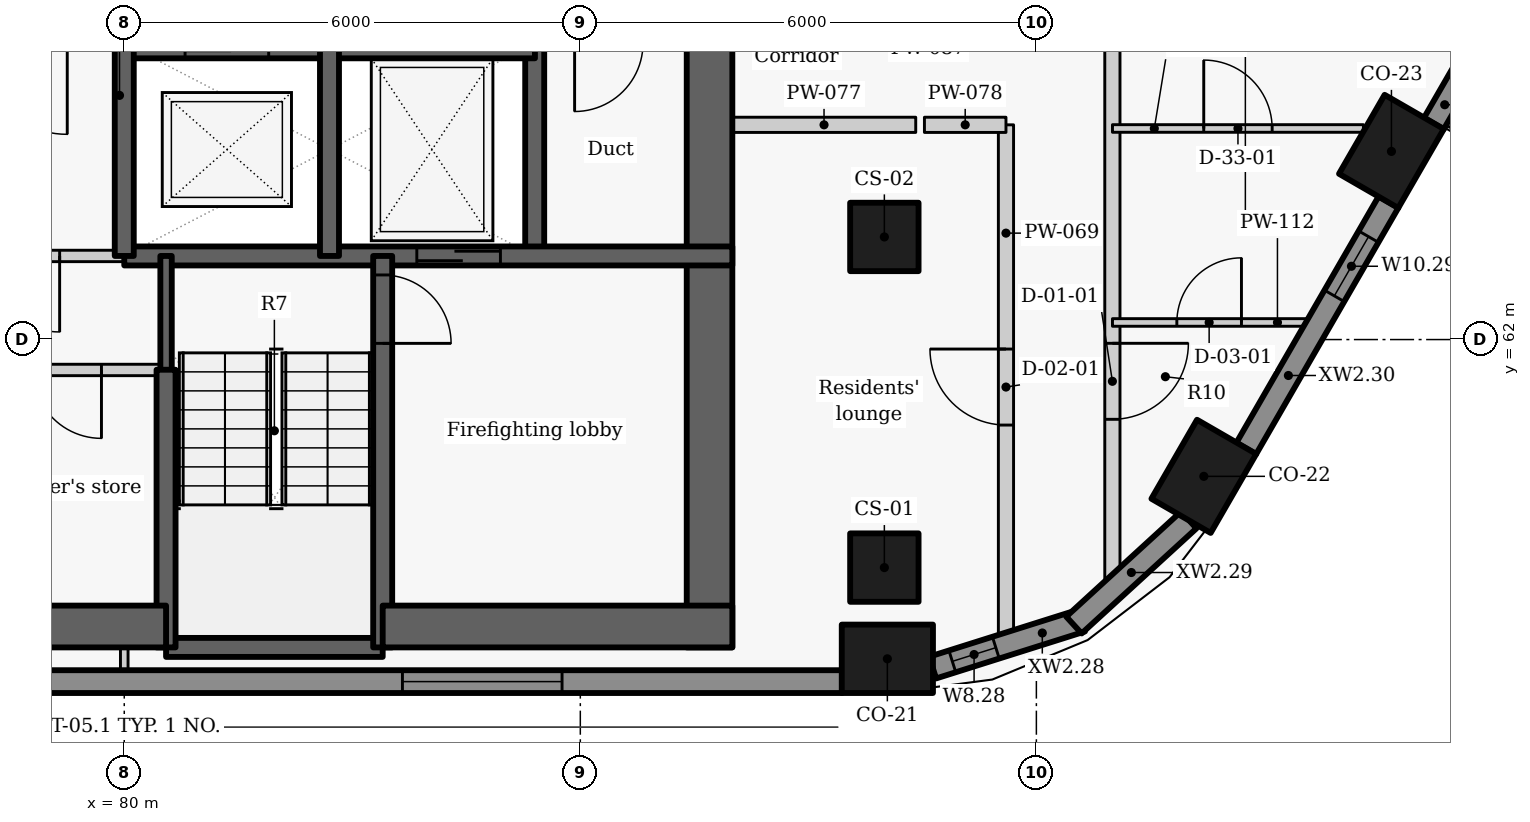
"""IFC4 building model, lengths in metres.
Left out: names, types, materials, properties, quantities, classifications, styles, units other than length and angle.
Written with IfcOpenShell. Run it as: python <this file> out.ifc"""

import sys

from ifc_helpers import new_model, si_unit, direction, frame, frame_2d, origin, origin_2d, place, context, subcontext, project, spatial, rectangle, extrude, element, fill, save


model = new_model("IFC4")
c1 = context("Model", 3, precision=1e-05, world=origin(), true_north=direction((0.0, 1.0)))
c2 = subcontext(c1, "Body", "Model", "MODEL_VIEW")
j1 = project(units=[si_unit("LENGTHUNIT", "METRE"), si_unit("PLANEANGLEUNIT", "RADIAN")], contexts=[c1])
p1 = place(None, origin())
s1 = spatial("IfcSite", under=j1, at=p1, CompositionType="ELEMENT")
p2 = place(p1, origin())
s2 = spatial("IfcBuilding", under=s1, at=p2, CompositionType="ELEMENT")
p3 = place(p2, frame((0.0, 0.0, 193.2)))
s3 = spatial("IfcBuildingStorey", under=s2, at=p3, CompositionType="ELEMENT", Elevation=193.2)
for number, where, z_axis, x_axis in (
    (1, (90.04, 57.8, 0.0), (0.0, 0.0, 1.0), (1.0, 0.0, 0.0)),
    (2, (94.203, 60.2, 0.0), (0.0, 0.0, 1.0), (0.5, 0.866, 0.0)),
    (3, (96.671, 64.475, 0.0), (0.0, 0.0, 1.0), (0.5, 0.866, 0.0)),
):
    element("IfcColumn", number, at=place(p3, frame(where, z_axis=z_axis, x_axis=x_axis)), inside=s3, PredefinedType="COLUMN", context=c2, shape_type="SweptSolid", body=[
        extrude(rectangle(XDim=1.2, YDim=0.9, at=origin_2d()), origin(), (0.0, 0.0, 1.0), 3.3),
    ])
for number, where, z_axis, x_axis in (
    (4, (90.0, 59.0, 0.0), (0.0, 0.0, 1.0), (0.0, 1.0, 0.0)),
    (5, (90.0, 63.35, 0.0), (0.0, 0.0, 1.0), (0.0, 1.0, 0.0)),
):
    element("IfcColumn", number, at=place(p3, frame(where, z_axis=z_axis, x_axis=x_axis)), inside=s3, PredefinedType="COLUMN", context=c2, shape_type="SweptSolid", body=[
        extrude(rectangle(XDim=0.9, YDim=0.9, at=origin_2d()), origin(), (0.0, 0.0, 1.0), 3.3),
    ])
p4 = place(p3, frame((70.551, 57.5, 0.0), z_axis=(0.0, 0.0, 1.0), x_axis=(1.0, 0.0, 0.0)))
e6 = element("IfcWall", 6, at=p4, inside=s3, PredefinedType="SOLIDWALL", context=c2, shape_type="SweptSolid", body=[
    extrude(rectangle(XDim=18.893, YDim=0.3, at=frame_2d((9.446, 0.0))), origin(), (0.0, 0.0, 1.0), 2.425),
])
p5 = place(p4, frame((3.687, 0.0, 0.9)))
e7 = element("IfcOpeningElement", 7, at=p5, cuts=e6, PredefinedType="OPENING", context=c2, shape_type="SweptSolid", body=[
    extrude(rectangle(XDim=2.1, YDim=1.1, at=frame_2d((1.05, 0.55))), frame((0.0, 0.16, 0.0), z_axis=(0.0, -1.0, 0.0), x_axis=(1.0, 0.0, 0.0)), (0.0, 0.0, 1.0), 0.32),
])
p6 = place(p4, frame((13.109, 0.0, 0.9)))
e8 = element("IfcOpeningElement", 8, at=p6, cuts=e6, PredefinedType="OPENING", context=c2, shape_type="SweptSolid", body=[
    extrude(rectangle(XDim=2.1, YDim=1.1, at=frame_2d((1.05, 0.55))), frame((0.0, 0.16, 0.0), z_axis=(0.0, -1.0, 0.0), x_axis=(1.0, 0.0, 0.0)), (0.0, 0.0, 1.0), 0.32),
])
p7 = place(p3, frame((90.636, 57.685, 0.0), z_axis=(0.0, 0.0, 1.0), x_axis=(0.95368324118, 0.300812691707, 0.0)))
e9 = element("IfcWall", 9, at=p7, inside=s3, PredefinedType="SOLIDWALL", context=c2, shape_type="SweptSolid", body=[
    extrude(rectangle(XDim=2.053, YDim=0.3, at=frame_2d((1.027, 0.0))), origin(), (0.0, 0.0, 1.0), 2.425),
])
p8 = place(p7, frame((0.271, 0.0, 0.9)))
e10 = element("IfcOpeningElement", 10, at=p8, cuts=e9, PredefinedType="OPENING", context=c2, shape_type="SweptSolid", body=[
    extrude(rectangle(XDim=0.6, YDim=1.1, at=frame_2d((0.3, 0.55))), frame((0.0, 0.16, 0.0), z_axis=(0.0, -1.0, 0.0), x_axis=(1.0, 0.0, 0.0)), (0.0, 0.0, 1.0), 0.32),
])
p9 = place(p3, frame((92.494, 58.244, 0.0), z_axis=(0.0, 0.0, 1.0), x_axis=(0.73764876128, 0.675184645102, 0.0)))
e11 = element("IfcWall", 11, at=p9, inside=s3, PredefinedType="SOLIDWALL", context=c2, shape_type="SweptSolid", body=[
    extrude(rectangle(XDim=2.048, YDim=0.3, at=frame_2d((1.024, 0.0))), origin(), (0.0, 0.0, 1.0), 2.425),
])
p10 = place(p3, frame((94.761, 60.567, 0.0), z_axis=(0.0, 0.0, 1.0), x_axis=(0.499982088007, 0.866035745032, 0.0)))
e12 = element("IfcWall", 12, at=p10, inside=s3, PredefinedType="SOLIDWALL", context=c2, shape_type="SweptSolid", body=[
    extrude(rectangle(XDim=3.744, YDim=0.3, at=frame_2d((1.872, 0.0))), origin(), (0.0, 0.0, 1.0), 2.425),
])
p11 = place(p10, frame((2.319, 0.0, 1.5)))
e13 = element("IfcOpeningElement", 13, at=p11, cuts=e12, PredefinedType="OPENING", context=c2, shape_type="SweptSolid", body=[
    extrude(rectangle(XDim=0.9, YDim=0.5, at=frame_2d((0.45, 0.25))), frame((0.0, 0.16, 0.0), z_axis=(0.0, -1.0, 0.0), x_axis=(1.0, 0.0, 0.0)), (0.0, 0.0, 1.0), 0.32),
])
p12 = place(p3, frame((97.229, 64.842, 0.0), z_axis=(0.0, 0.0, 1.0), x_axis=(0.500059225181, 0.86599120741, 0.0)))
e14 = element("IfcWall", 14, at=p12, inside=s3, PredefinedType="SOLIDWALL", context=c2, shape_type="SweptSolid", body=[
    extrude(rectangle(XDim=3.744, YDim=0.3, at=frame_2d((1.872, 0.0))), origin(), (0.0, 0.0, 1.0), 2.425),
])
p13 = place(p12, frame((0.672, 0.0, 0.0)))
e15 = element("IfcOpeningElement", 15, at=p13, cuts=e14, PredefinedType="OPENING", context=c2, shape_type="SweptSolid", body=[
    extrude(rectangle(XDim=2.4, YDim=2.0, at=frame_2d((1.2, 1.0))), frame((0.0, 0.16, 0.0), z_axis=(0.0, -1.0, 0.0), x_axis=(1.0, 0.0, 0.0)), (0.0, 0.0, 1.0), 0.32),
])
p14 = place(p3, frame((85.4, 63.1, -0.275), z_axis=(0.0, 0.0, 1.0), x_axis=(0.0, 1.0, 0.0)))
e16 = element("IfcWall", 16, at=p14, inside=s3, PredefinedType="SHEAR", context=c2, shape_type="SweptSolid", body=[
    extrude(rectangle(XDim=2.8, YDim=0.25, at=frame_2d((1.4, 0.0))), origin(), (0.0, 0.0, 1.0), 3.3),
])
p15 = place(p3, frame((87.7, 72.2, -0.275), z_axis=(0.0, 0.0, 1.0), x_axis=(0.0, -1.0, 0.0)))
e17 = element("IfcWall", 17, at=p15, inside=s3, PredefinedType="SHEAR", context=c2, shape_type="SweptSolid", body=[
    extrude(rectangle(XDim=14.25, YDim=0.6, at=frame_2d((7.125, 0.0))), origin(), (0.0, 0.0, 1.0), 3.3),
])
p16 = place(p15, frame((3.852, 0.0, 0.275)))
e18 = element("IfcOpeningElement", 18, at=p16, cuts=e17, PredefinedType="OPENING", context=c2, shape_type="SweptSolid", body=[
    extrude(rectangle(XDim=1.5, YDim=2.1, at=frame_2d((0.75, 1.05))), frame((0.0, 0.31, 0.0), z_axis=(0.0, -1.0, 0.0), x_axis=(1.0, 0.0, 0.0)), (0.0, 0.0, 1.0), 0.62),
])
p17 = place(p3, frame((79.997, 65.9, -0.275), z_axis=(0.0, 0.0, 1.0), x_axis=(1.0, 0.0, 0.0)))
e19 = element("IfcWall", 19, at=p17, inside=s3, PredefinedType="SHEAR", context=c2, shape_type="SweptSolid", body=[
    extrude(rectangle(XDim=5.406, YDim=0.4, at=frame_2d((2.703, 0.0))), origin(), (0.0, 0.0, 1.0), 3.3),
])
p18 = place(p17, frame((0.803, 0.0, 0.275)))
e20 = element("IfcOpeningElement", 20, at=p18, cuts=e19, PredefinedType="OPENING", context=c2, shape_type="SweptSolid", body=[
    extrude(rectangle(XDim=1.1, YDim=2.1, at=frame_2d((0.55, 1.05))), frame((0.0, 0.21, 0.0), z_axis=(0.0, -1.0, 0.0), x_axis=(1.0, 0.0, 0.0)), (0.0, 0.0, 1.0), 0.42),
])
p19 = place(p3, frame((80.0, 63.1, -0.275), z_axis=(0.0, 0.0, 1.0), x_axis=(1.0, 0.0, 0.0)))
e21 = element("IfcWall", 21, at=p19, inside=s3, PredefinedType="SHEAR", context=c2, shape_type="SweptSolid", body=[
    extrude(rectangle(XDim=8.0, YDim=0.25, at=frame_2d((4.0, 0.0))), origin(), (0.0, 0.0, 1.0), 3.3),
])
p20 = place(p19, frame((3.849, 0.0, 0.275)))
e22 = element("IfcOpeningElement", 22, at=p20, cuts=e21, PredefinedType="OPENING", context=c2, shape_type="SweptSolid", body=[
    extrude(rectangle(XDim=1.1, YDim=2.1, at=frame_2d((0.55, 1.05))), frame((0.0, 0.135, 0.0), z_axis=(0.0, -1.0, 0.0), x_axis=(1.0, 0.0, 0.0)), (0.0, 0.0, 1.0), 0.27),
])
p21 = place(p3, frame((80.0, 63.1, -0.275), z_axis=(0.0, 0.0, 1.0), x_axis=(0.0, 1.0, 0.0)))
e23 = element("IfcWall", 23, at=p21, inside=s3, PredefinedType="SHEAR", context=c2, shape_type="SweptSolid", body=[
    extrude(rectangle(XDim=2.8, YDim=0.25, at=frame_2d((1.4, 0.0))), origin(), (0.0, 0.0, 1.0), 3.3),
])
p22 = place(p3, frame((80.0, 63.1, 0.0), z_axis=(0.0, 0.0, 1.0), x_axis=(-1.0, 0.0, 0.0)))
e24 = element("IfcWall", 24, at=p22, inside=s3, PredefinedType="PARTITIONING", context=c2, shape_type="SweptSolid", body=[
    extrude(rectangle(XDim=2.7, YDim=0.15, at=frame_2d((1.35, 0.0))), origin(), (0.0, 0.0, 1.0), 3.025),
])
p23 = place(p22, frame((0.85, 0.0, 0.0)))
e25 = element("IfcOpeningElement", 25, at=p23, cuts=e24, PredefinedType="OPENING", context=c2, shape_type="SweptSolid", body=[
    extrude(rectangle(XDim=1.0, YDim=2.1, at=frame_2d((0.5, 1.05))), frame((0.0, 0.085, 0.0), z_axis=(0.0, -1.0, 0.0), x_axis=(1.0, 0.0, 0.0)), (0.0, 0.0, 1.0), 0.17),
])
p24 = place(p3, frame((82.7, 63.1, -0.275), z_axis=(0.0, 0.0, 1.0), x_axis=(0.0, 1.0, 0.0)))
e26 = element("IfcWall", 26, at=p24, inside=s3, PredefinedType="SHEAR", context=c2, shape_type="SweptSolid", body=[
    extrude(rectangle(XDim=2.8, YDim=0.25, at=frame_2d((1.4, 0.0))), origin(), (0.0, 0.0, 1.0), 3.3),
])
p25 = place(p3, frame((80.55, 57.95, -0.275), z_axis=(0.0, 0.0, 1.0), x_axis=(1.0, 0.0, 0.0)))
e27 = element("IfcWall", 27, at=p25, inside=s3, PredefinedType="SHEAR", context=c2, shape_type="SweptSolid", body=[
    extrude(rectangle(XDim=2.85, YDim=0.25, at=frame_2d((1.425, 0.0))), origin(), (0.0, 0.0, 1.0), 3.3),
])
p26 = place(p3, frame((83.4, 63.1, -0.275), z_axis=(0.0, 0.0, 1.0), x_axis=(0.0, -1.0, 0.0)))
e28 = element("IfcWall", 28, at=p26, inside=s3, PredefinedType="SHEAR", context=c2, shape_type="SweptSolid", body=[
    extrude(rectangle(XDim=5.15, YDim=0.25, at=frame_2d((2.575, 0.0))), origin(), (0.0, 0.0, 1.0), 3.3),
])
p27 = place(p26, frame((0.25, 0.0, 0.275)))
e29 = element("IfcOpeningElement", 29, at=p27, cuts=e28, PredefinedType="OPENING", context=c2, shape_type="SweptSolid", body=[
    extrude(rectangle(XDim=0.9, YDim=2.1, at=frame_2d((0.45, 1.05))), frame((0.0, 0.135, 0.0), z_axis=(0.0, -1.0, 0.0), x_axis=(1.0, 0.0, 0.0)), (0.0, 0.0, 1.0), 0.27),
])
p28 = place(p3, frame((80.55, 61.597, -0.275), z_axis=(0.0, 0.0, 1.0), x_axis=(0.0, 1.0, 0.0)))
e30 = element("IfcWall", 30, at=p28, inside=s3, PredefinedType="SHEAR", context=c2, shape_type="SweptSolid", body=[
    extrude(rectangle(XDim=1.503, YDim=0.15, at=frame_2d((0.751, 0.0))), origin(), (0.0, 0.0, 1.0), 3.3),
])
p29 = place(p3, frame((80.55, 57.95, -0.275), z_axis=(0.0, 0.0, 1.0), x_axis=(0.0, 1.0, 0.0)))
e31 = element("IfcWall", 31, at=p29, inside=s3, PredefinedType="SHEAR", context=c2, shape_type="SweptSolid", body=[
    extrude(rectangle(XDim=3.653, YDim=0.25, at=frame_2d((1.827, 0.0))), origin(), (0.0, 0.0, 1.0), 3.3),
])
p30 = place(p3, frame((75.35, 58.225, -0.275), z_axis=(0.0, 0.0, 1.0), x_axis=(1.0, 0.0, 0.0)))
e32 = element("IfcWall", 32, at=p30, inside=s3, PredefinedType="SHEAR", context=c2, shape_type="SweptSolid", body=[
    extrude(rectangle(XDim=5.2, YDim=0.55, at=frame_2d((2.6, 0.0))), origin(), (0.0, 0.0, 1.0), 3.3),
])
p31 = place(p3, frame((83.4, 58.225, -0.275), z_axis=(0.0, 0.0, 1.0), x_axis=(1.0, 0.0, 0.0)))
e33 = element("IfcWall", 33, at=p31, inside=s3, PredefinedType="SHEAR", context=c2, shape_type="SweptSolid", body=[
    extrude(rectangle(XDim=4.6, YDim=0.55, at=frame_2d((2.3, 0.0))), origin(), (0.0, 0.0, 1.0), 3.3),
])
p32 = place(p3, frame((80.55, 61.6, 0.0), z_axis=(0.0, 0.0, 1.0), x_axis=(-1.0, 0.0, 0.0)))
e34 = element("IfcWall", 34, at=p32, inside=s3, PredefinedType="PARTITIONING", context=c2, shape_type="SweptSolid", body=[
    extrude(rectangle(XDim=5.2, YDim=0.15, at=frame_2d((2.6, 0.0))), origin(), (0.0, 0.0, 1.0), 3.025),
])
p33 = place(p32, frame((3.45, 0.0, 0.0)))
e35 = element("IfcOpeningElement", 35, at=p33, cuts=e34, PredefinedType="OPENING", context=c2, shape_type="SweptSolid", body=[
    extrude(rectangle(XDim=0.9, YDim=2.1, at=frame_2d((0.45, 1.05))), frame((0.0, 0.085, 0.0), z_axis=(0.0, -1.0, 0.0), x_axis=(1.0, 0.0, 0.0)), (0.0, 0.0, 1.0), 0.17),
])
p34 = place(p32, frame((0.85, 0.0, 0.0)))
e36 = element("IfcOpeningElement", 36, at=p34, cuts=e34, PredefinedType="OPENING", context=c2, shape_type="SweptSolid", body=[
    extrude(rectangle(XDim=0.9, YDim=2.1, at=frame_2d((0.45, 1.05))), frame((0.0, 0.085, 0.0), z_axis=(0.0, -1.0, 0.0), x_axis=(1.0, 0.0, 0.0)), (0.0, 0.0, 1.0), 0.17),
])
p35 = place(p3, frame((91.6, 57.926, 0.0), z_axis=(0.0, 0.0, 1.0), x_axis=(0.0, 1.0, 0.0)))
e37 = element("IfcWall", 37, at=p35, inside=s3, PredefinedType="PARTITIONING", context=c2, shape_type="SweptSolid", body=[
    extrude(rectangle(XDim=6.899, YDim=0.2, at=frame_2d((3.449, 0.0))), origin(), (0.0, 0.0, 1.0), 2.405),
])
p36 = place(p35, frame((2.949, 0.0, 0.0)))
e38 = element("IfcOpeningElement", 38, at=p36, cuts=e37, PredefinedType="OPENING", context=c2, shape_type="SweptSolid", body=[
    extrude(rectangle(XDim=1.0, YDim=2.1, at=frame_2d((0.5, 1.05))), frame((0.0, 0.11, 0.0), z_axis=(0.0, -1.0, 0.0), x_axis=(1.0, 0.0, 0.0)), (0.0, 0.0, 1.0), 0.22),
])
p37 = place(p3, frame((88.0, 64.825, 0.0), z_axis=(0.0, 0.0, 1.0), x_axis=(1.0, 0.0, 0.0)))
e39 = element("IfcWall", 39, at=p37, inside=s3, PredefinedType="PARTITIONING", context=c2, shape_type="SweptSolid", body=[
    extrude(rectangle(XDim=2.413, YDim=0.2, at=frame_2d((1.207, 0.0))), origin(), (0.0, 0.0, 1.0), 2.505),
])
p38 = place(p3, frame((90.527, 64.825, 0.0), z_axis=(0.0, 0.0, 1.0), x_axis=(1.0, 0.0, 0.0)))
e40 = element("IfcWall", 40, at=p38, inside=s3, PredefinedType="PARTITIONING", context=c2, shape_type="SweptSolid", body=[
    extrude(rectangle(XDim=1.073, YDim=0.2, at=frame_2d((0.537, 0.0))), origin(), (0.0, 0.0, 1.0), 3.025),
])
p39 = place(p3, frame((93.0, 101.281, 0.0), z_axis=(0.0, 0.0, 1.0), x_axis=(0.0, -1.0, 0.0)))
e41 = element("IfcWall", 41, at=p39, inside=s3, PredefinedType="PARTITIONING", context=c2, shape_type="SweptSolid", body=[
    extrude(rectangle(XDim=42.606, YDim=0.2, at=frame_2d((21.303, 0.0))), origin(), (0.0, 0.0, 1.0), 2.405),
])
p40 = place(p39, frame((39.33, 0.0, 0.0)))
e42 = element("IfcOpeningElement", 42, at=p40, cuts=e41, PredefinedType="OPENING", context=c2, shape_type="SweptSolid", body=[
    extrude(rectangle(XDim=1.0, YDim=2.1, at=frame_2d((0.5, 1.05))), frame((0.0, 0.11, 0.0), z_axis=(0.0, -1.0, 0.0), x_axis=(1.0, 0.0, 0.0)), (0.0, 0.0, 1.0), 0.22),
])
p41 = place(p39, frame((27.005, 0.0, 0.0)))
e43 = element("IfcOpeningElement", 43, at=p41, cuts=e41, PredefinedType="OPENING", context=c2, shape_type="SweptSolid", body=[
    extrude(rectangle(XDim=1.0, YDim=2.1, at=frame_2d((0.5, 1.05))), frame((0.0, 0.11, 0.0), z_axis=(0.0, -1.0, 0.0), x_axis=(1.0, 0.0, 0.0)), (0.0, 0.0, 1.0), 0.22),
])
p42 = place(p39, frame((9.168, 0.0, 0.0)))
e44 = element("IfcOpeningElement", 44, at=p42, cuts=e41, PredefinedType="OPENING", context=c2, shape_type="SweptSolid", body=[
    extrude(rectangle(XDim=1.0, YDim=2.1, at=frame_2d((0.5, 1.05))), frame((0.0, 0.11, 0.0), z_axis=(0.0, -1.0, 0.0), x_axis=(1.0, 0.0, 0.0)), (0.0, 0.0, 1.0), 0.22),
])
p43 = place(p39, frame((3.937, 0.0, 0.0)))
e45 = element("IfcOpeningElement", 45, at=p43, cuts=e41, PredefinedType="OPENING", context=c2, shape_type="SweptSolid", body=[
    extrude(rectangle(XDim=1.0, YDim=2.1, at=frame_2d((0.5, 1.05))), frame((0.0, 0.11, 0.0), z_axis=(0.0, -1.0, 0.0), x_axis=(1.0, 0.0, 0.0)), (0.0, 0.0, 1.0), 0.22),
])
p44 = place(p3, frame((80.0, 57.65, 0.0), z_axis=(0.0, 0.0, 1.0), x_axis=(0.0, 1.0, 0.0)))
e46 = element("IfcWall", 46, at=p44, inside=s3, PredefinedType="PARTITIONING", context=c2, shape_type="SweptSolid", body=[
    extrude(rectangle(XDim=0.3, YDim=0.1, at=frame_2d((0.15, 0.0))), origin(), (0.0, 0.0, 1.0), 3.025),
])
p45 = place(p3, frame((93.001, 62.225, 0.0), z_axis=(0.0, 0.0, 1.0), x_axis=(1.0, 0.0, 0.0)))
e47 = element("IfcWall", 47, at=p45, inside=s3, PredefinedType="PARTITIONING", context=c2, shape_type="SweptSolid", body=[
    extrude(rectangle(XDim=2.544, YDim=0.1, at=frame_2d((1.272, 0.0))), origin(), (0.0, 0.0, 1.0), 2.405),
])
p46 = place(p45, frame((0.847, 0.0, 0.0)))
e48 = element("IfcOpeningElement", 48, at=p46, cuts=e47, PredefinedType="OPENING", context=c2, shape_type="SweptSolid", body=[
    extrude(rectangle(XDim=0.85, YDim=2.1, at=frame_2d((0.425, 1.05))), frame((0.0, 0.06, 0.0), z_axis=(0.0, -1.0, 0.0), x_axis=(1.0, 0.0, 0.0)), (0.0, 0.0, 1.0), 0.12),
])
p47 = place(p3, frame((93.001, 64.777, 0.0), z_axis=(0.0, 0.0, 1.0), x_axis=(1.0, 0.0, 0.0)))
e49 = element("IfcWall", 49, at=p47, inside=s3, PredefinedType="PARTITIONING", context=c2, shape_type="SweptSolid", body=[
    extrude(rectangle(XDim=3.302, YDim=0.1, at=frame_2d((1.651, 0.0))), origin(), (0.0, 0.0, 1.0), 3.025),
])
p48 = place(p47, frame((1.201, 0.0, 0.0)))
e50 = element("IfcOpeningElement", 50, at=p48, cuts=e49, PredefinedType="OPENING", context=c2, shape_type="SweptSolid", body=[
    extrude(rectangle(XDim=0.9, YDim=2.1, at=frame_2d((0.45, 1.05))), frame((0.0, 0.06, 0.0), z_axis=(0.0, -1.0, 0.0), x_axis=(1.0, 0.0, 0.0)), (0.0, 0.0, 1.0), 0.12),
])
p49 = place(p6, origin())
e51 = element("IfcWindow", 51, at=p49, inside=s3, PartitioningType="SINGLE_PANEL", PredefinedType="WINDOW", context=c2, shape_type="SweptSolid", body=[
    extrude(rectangle(XDim=2.1, YDim=1.1, at=frame_2d((1.05, 0.55))), frame((0.0, 0.03, 0.0), z_axis=(0.0, -1.0, 0.0), x_axis=(1.0, 0.0, 0.0)), (0.0, 0.0, 1.0), 0.06),
])
fill(e8, e51)
p50 = place(p8, origin())
e52 = element("IfcWindow", 52, at=p50, inside=s3, PartitioningType="SINGLE_PANEL", PredefinedType="WINDOW", context=c2, shape_type="SweptSolid", body=[
    extrude(rectangle(XDim=0.6, YDim=1.1, at=frame_2d((0.3, 0.55))), frame((0.0, 0.03, 0.0), z_axis=(0.0, -1.0, 0.0), x_axis=(1.0, 0.0, 0.0)), (0.0, 0.0, 1.0), 0.06),
])
fill(e10, e52)
p51 = place(p11, origin())
e53 = element("IfcWindow", 53, at=p51, inside=s3, PartitioningType="SINGLE_PANEL", PredefinedType="WINDOW", context=c2, shape_type="SweptSolid", body=[
    extrude(rectangle(XDim=0.9, YDim=0.5, at=frame_2d((0.45, 0.25))), frame((0.0, 0.03, 0.0), z_axis=(0.0, -1.0, 0.0), x_axis=(1.0, 0.0, 0.0)), (0.0, 0.0, 1.0), 0.06),
])
fill(e13, e53)
p52 = place(p20, origin())
e54 = element("IfcDoor", 54, at=p52, inside=s3, OperationType="SLIDING_TO_LEFT", PredefinedType="DOOR", context=c2, shape_type="SweptSolid", body=[
    extrude(rectangle(XDim=1.1, YDim=2.1, at=frame_2d((0.55, 1.05))), frame((0.0, 0.025, 0.0), z_axis=(0.0, -1.0, 0.0), x_axis=(1.0, 0.0, 0.0)), (0.0, 0.0, 1.0), 0.05),
])
fill(e22, e54)
p53 = place(p23, origin())
e55 = element("IfcDoor", 55, at=p53, inside=s3, OperationType="SINGLE_SWING_LEFT", PredefinedType="DOOR", context=c2, shape_type="SweptSolid", body=[
    extrude(rectangle(XDim=1.0, YDim=2.1, at=frame_2d((0.5, 1.05))), frame((0.0, 0.025, 0.0), z_axis=(0.0, -1.0, 0.0), x_axis=(1.0, 0.0, 0.0)), (0.0, 0.0, 1.0), 0.05),
])
fill(e25, e55)
p54 = place(p34, origin())
e56 = element("IfcDoor", 56, at=p54, inside=s3, OperationType="SINGLE_SWING_LEFT", PredefinedType="DOOR", context=c2, shape_type="SweptSolid", body=[
    extrude(rectangle(XDim=0.9, YDim=2.1, at=frame_2d((0.45, 1.05))), frame((0.0, 0.025, 0.0), z_axis=(0.0, -1.0, 0.0), x_axis=(1.0, 0.0, 0.0)), (0.0, 0.0, 1.0), 0.05),
])
fill(e36, e56)
p55 = place(p27, origin())
e57 = element("IfcDoor", 57, at=p55, inside=s3, OperationType="SINGLE_SWING_RIGHT", PredefinedType="DOOR", context=c2, shape_type="SweptSolid", body=[
    extrude(rectangle(XDim=0.9, YDim=2.1, at=frame_2d((0.45, 1.05))), frame((0.0, 0.025, 0.0), z_axis=(0.0, -1.0, 0.0), x_axis=(1.0, 0.0, 0.0)), (0.0, 0.0, 1.0), 0.05),
])
fill(e29, e57)
p56 = place(p36, origin())
e58 = element("IfcDoor", 58, at=p56, inside=s3, OperationType="SINGLE_SWING_RIGHT", PredefinedType="DOOR", context=c2, shape_type="SweptSolid", body=[
    extrude(rectangle(XDim=1.0, YDim=2.1, at=frame_2d((0.5, 1.05))), frame((0.0, 0.025, 0.0), z_axis=(0.0, -1.0, 0.0), x_axis=(1.0, 0.0, 0.0)), (0.0, 0.0, 1.0), 0.05),
])
fill(e38, e58)
p57 = place(p40, origin())
e59 = element("IfcDoor", 59, at=p57, inside=s3, OperationType="SINGLE_SWING_LEFT", PredefinedType="DOOR", context=c2, shape_type="SweptSolid", body=[
    extrude(rectangle(XDim=1.0, YDim=2.1, at=frame_2d((0.5, 1.05))), frame((0.0, 0.025, 0.0), z_axis=(0.0, -1.0, 0.0), x_axis=(1.0, 0.0, 0.0)), (0.0, 0.0, 1.0), 0.05),
])
fill(e42, e59)
p58 = place(p46, origin())
e60 = element("IfcDoor", 60, at=p58, inside=s3, OperationType="SINGLE_SWING_RIGHT", PredefinedType="DOOR", context=c2, shape_type="SweptSolid", body=[
    extrude(rectangle(XDim=0.85, YDim=2.1, at=frame_2d((0.425, 1.05))), frame((0.0, 0.025, 0.0), z_axis=(0.0, -1.0, 0.0), x_axis=(1.0, 0.0, 0.0)), (0.0, 0.0, 1.0), 0.05),
])
fill(e48, e60)
p59 = place(p48, origin())
e61 = element("IfcDoor", 61, at=p59, inside=s3, OperationType="SINGLE_SWING_LEFT", PredefinedType="DOOR", context=c2, shape_type="SweptSolid", body=[
    extrude(rectangle(XDim=0.9, YDim=2.1, at=frame_2d((0.45, 1.05))), frame((0.0, 0.025, 0.0), z_axis=(0.0, -1.0, 0.0), x_axis=(1.0, 0.0, 0.0)), (0.0, 0.0, 1.0), 0.05),
])
fill(e50, e61)
save(model, sys.argv[1])
